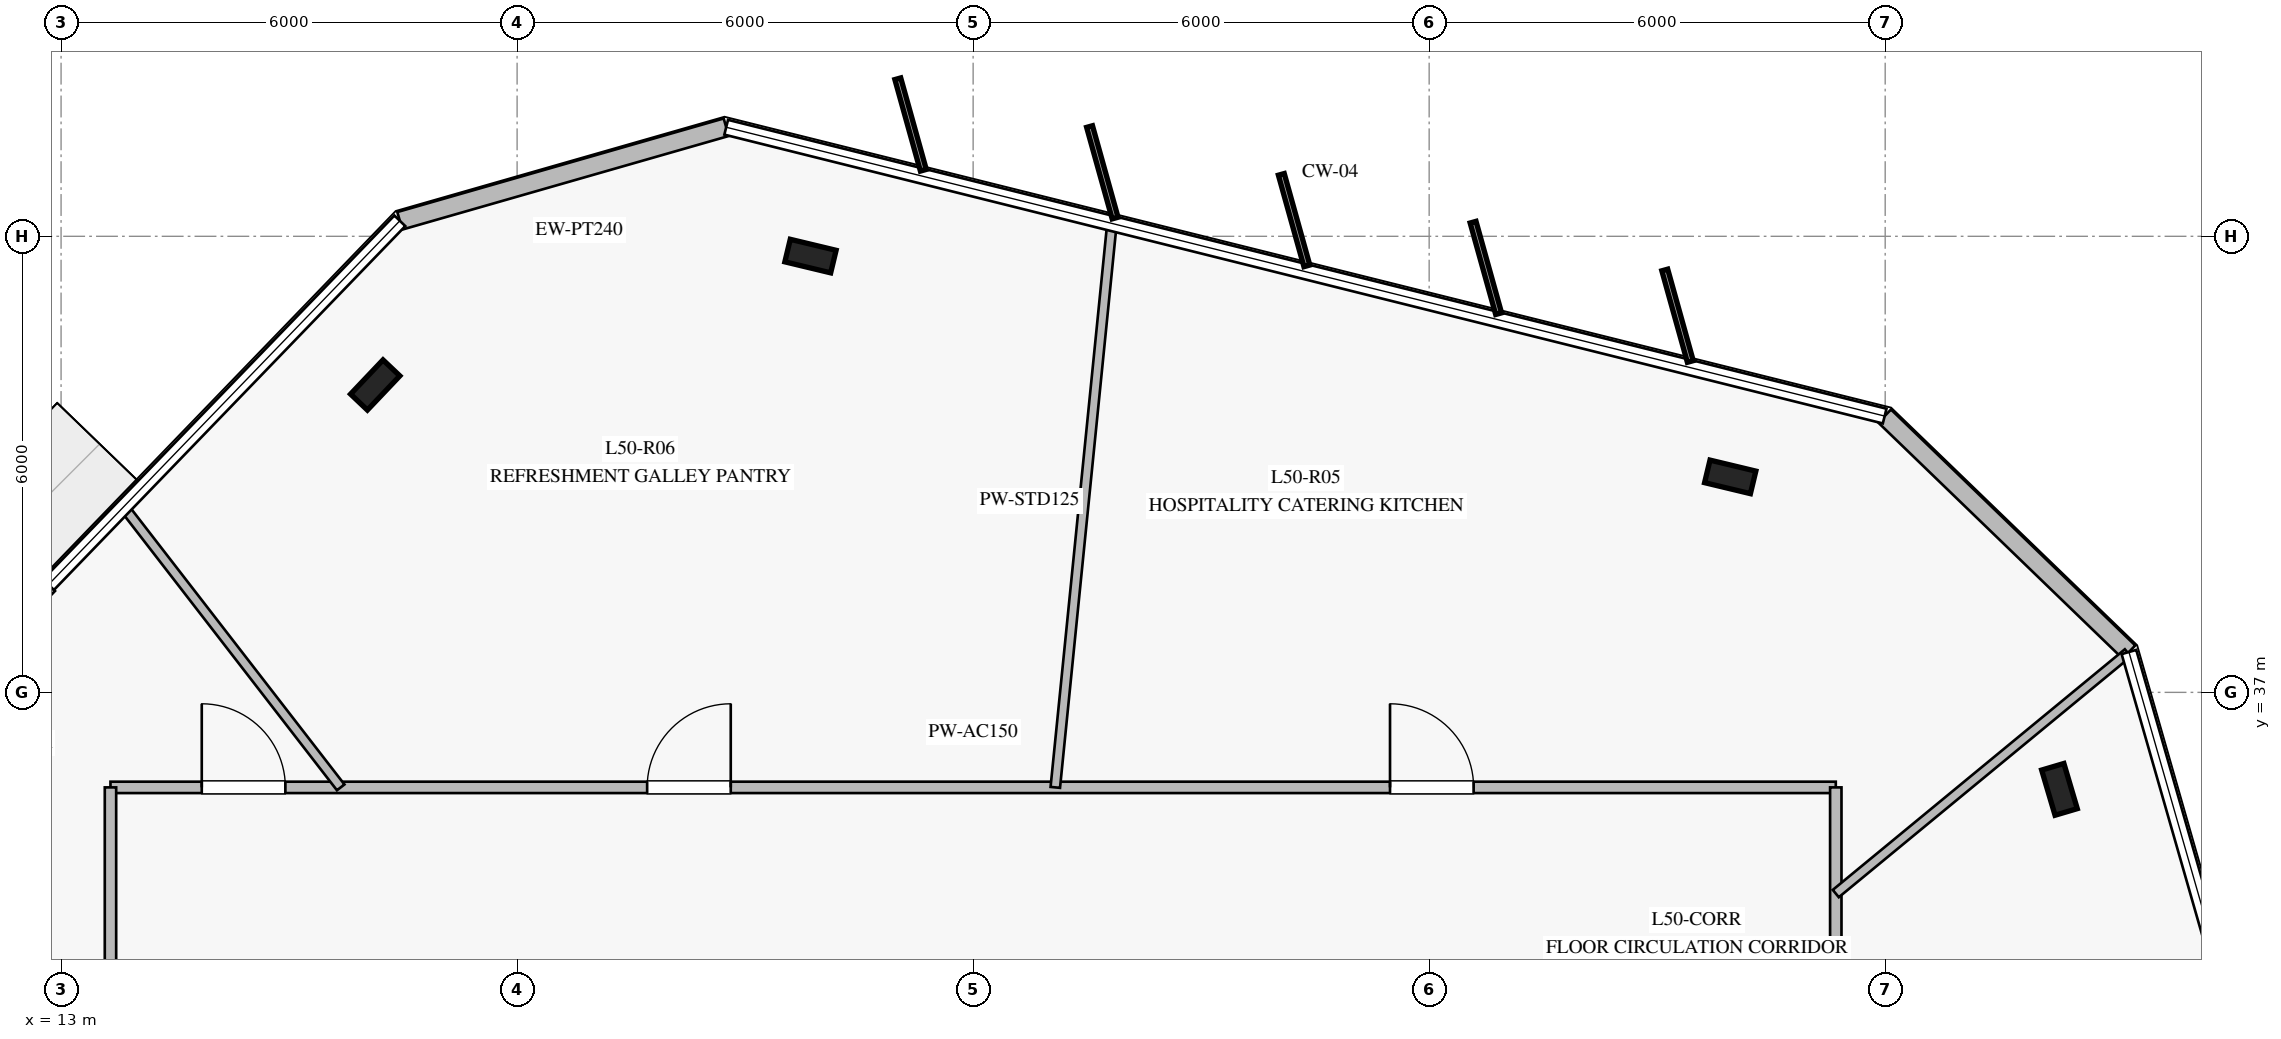
"""IFC4 building model, lengths in metres.
Left out: names, types, materials, properties, quantities, classifications, styles, units other than length and angle.
Written with IfcOpenShell. Run it as: python <this file> out.ifc"""

import sys

from ifc_helpers import new_model, si_unit, direction, frame, frame_2d, origin, origin_2d, place, context, subcontext, project, spatial, rectangle, i_section, extrude, element, fill, save


model = new_model("IFC4")
c1 = context("Model", 3, precision=1e-05, world=origin(), true_north=direction((0.0, 1.0)))
c2 = subcontext(c1, "Body", "Model", "MODEL_VIEW")
j1 = project(units=[si_unit("LENGTHUNIT", "METRE"), si_unit("PLANEANGLEUNIT", "RADIAN")], contexts=[c1])
p1 = place(None, origin())
s1 = spatial("IfcSite", under=j1, at=p1, CompositionType="ELEMENT")
p2 = place(p1, origin())
s2 = spatial("IfcBuilding", under=s1, at=p2, CompositionType="ELEMENT")
p3 = place(p2, frame((0.0, 0.0, 208.8)))
s3 = spatial("IfcBuildingStorey", under=s2, at=p3, CompositionType="ELEMENT", Elevation=208.8)
for number, where, z_axis, x_axis in (
    (1, (34.961, 39.835, 0.0), (0.0, 0.0, 1.0), (-0.972, 0.233, 0.0)),
    (2, (22.86, 42.74, 0.0), (0.0, 0.0, 1.0), (-0.972, 0.233, 0.0)),
    (3, (17.133, 41.044, 0.0), (0.0, 0.0, 1.0), (0.688, 0.725, 0.0)),
    (4, (39.293, 35.724, 0.0), (0.0, 0.0, 1.0), (-0.284, 0.959, 0.0)),
):
    element("IfcColumn", number, at=place(p3, frame(where, z_axis=z_axis, x_axis=x_axis)), inside=s3, PredefinedType="COLUMN", context=c2, shape_type="SweptSolid", body=[
        extrude(i_section(OverallWidth=0.305, OverallDepth=0.62, WebThickness=0.021, FlangeThickness=0.04, at=origin_2d()), origin(), (0.0, 0.0, 1.0), 4.0),
    ])
p4 = place(p3, frame((21.751, 44.435, 0.0), z_axis=(0.0, 0.0, 1.0), x_axis=(-0.961280198868, -0.275572820258, 0.0)))
e5 = element("IfcWall", 5, at=p4, inside=s3, PredefinedType="STANDARD", context=c2, shape_type="SweptSolid", body=[
    extrude(rectangle(XDim=4.467, YDim=0.24, at=frame_2d((2.233, 0.0))), origin(), (0.0, 0.0, 1.0), 3.78),
])
p5 = place(p3, frame((12.834, 38.417, 0.0), z_axis=(0.0, 0.0, 1.0), x_axis=(-0.694688923552, -0.719310294305, 0.0)))
e6 = element("IfcWall", 6, at=p5, inside=s3, PredefinedType="STANDARD", context=c2, shape_type="SweptSolid", body=[
    extrude(rectangle(XDim=2.4, YDim=0.24, at=frame_2d((1.2, 0.0))), origin(), (0.0, 0.0, 1.0), 3.78),
])
p6 = place(p5, frame((0.4, 0.0, 0.0)))
e7 = element("IfcOpeningElement", 7, at=p6, cuts=e6, PredefinedType="OPENING", context=c2, shape_type="SweptSolid", body=[
    extrude(rectangle(XDim=1.6, YDim=2.25, at=frame_2d((0.8, 1.125))), frame((0.0, 0.13, 0.0), z_axis=(0.0, -1.0, 0.0), x_axis=(1.0, 0.0, 0.0)), (0.0, 0.0, 1.0), 0.26),
])
p7 = place(p3, frame((40.207, 37.531, 0.0), z_axis=(0.0, 0.0, 1.0), x_axis=(-0.719320489357, 0.69467836701, 0.0)))
e8 = element("IfcWall", 8, at=p7, inside=s3, PredefinedType="STANDARD", context=c2, shape_type="SweptSolid", body=[
    extrude(rectangle(XDim=4.468, YDim=0.24, at=frame_2d((2.234, 0.0))), origin(), (0.0, 0.0, 1.0), 3.78),
])
p8 = place(p3, frame((13.65, 35.75, 0.0), z_axis=(0.0, 0.0, 1.0), x_axis=(1.0, 0.0, 0.0)))
e9 = element("IfcWall", 9, at=p8, inside=s3, PredefinedType="PARTITIONING", context=c2, shape_type="SweptSolid", body=[
    extrude(rectangle(XDim=22.7, YDim=0.15, at=frame_2d((11.35, 0.0))), origin(), (0.0, 0.0, 1.0), 3.28),
])
p9 = place(p8, frame((16.835, 0.0, 0.0)))
e10 = element("IfcOpeningElement", 10, at=p9, cuts=e9, PredefinedType="OPENING", context=c2, shape_type="SweptSolid", body=[
    extrude(rectangle(XDim=1.1, YDim=2.2, at=frame_2d((0.55, 1.1))), frame((0.0, 0.085, 0.0), z_axis=(0.0, -1.0, 0.0), x_axis=(1.0, 0.0, 0.0)), (0.0, 0.0, 1.0), 0.17),
])
p10 = place(p8, frame((7.061, 0.0, 0.0)))
e11 = element("IfcOpeningElement", 11, at=p10, cuts=e9, PredefinedType="OPENING", context=c2, shape_type="SweptSolid", body=[
    extrude(rectangle(XDim=1.1, YDim=2.2, at=frame_2d((0.55, 1.1))), frame((0.0, 0.085, 0.0), z_axis=(0.0, -1.0, 0.0), x_axis=(1.0, 0.0, 0.0)), (0.0, 0.0, 1.0), 0.17),
])
p11 = place(p8, frame((1.201, 0.0, 0.0)))
e12 = element("IfcOpeningElement", 12, at=p11, cuts=e9, PredefinedType="OPENING", context=c2, shape_type="SweptSolid", body=[
    extrude(rectangle(XDim=1.1, YDim=2.2, at=frame_2d((0.55, 1.1))), frame((0.0, 0.085, 0.0), z_axis=(0.0, -1.0, 0.0), x_axis=(1.0, 0.0, 0.0)), (0.0, 0.0, 1.0), 0.17),
])
p12 = place(p3, frame((36.35, 35.75, 0.0), z_axis=(0.0, 0.0, 1.0), x_axis=(0.0, -1.0, 0.0)))
e13 = element("IfcWall", 13, at=p12, inside=s3, PredefinedType="PARTITIONING", context=c2, shape_type="SweptSolid", body=[
    extrude(rectangle(XDim=21.5, YDim=0.15, at=frame_2d((10.75, 0.0))), origin(), (0.0, 0.0, 1.0), 3.05),
])
p13 = place(p12, frame((16.142, 0.0, 0.0)))
e14 = element("IfcOpeningElement", 14, at=p13, cuts=e13, PredefinedType="OPENING", context=c2, shape_type="SweptSolid", body=[
    extrude(rectangle(XDim=1.1, YDim=2.2, at=frame_2d((0.55, 1.1))), frame((0.0, 0.085, 0.0), z_axis=(0.0, -1.0, 0.0), x_axis=(1.0, 0.0, 0.0)), (0.0, 0.0, 1.0), 0.17),
])
p14 = place(p12, frame((6.148, 0.0, 0.0)))
e15 = element("IfcOpeningElement", 15, at=p14, cuts=e13, PredefinedType="OPENING", context=c2, shape_type="SweptSolid", body=[
    extrude(rectangle(XDim=1.1, YDim=2.2, at=frame_2d((0.55, 1.1))), frame((0.0, 0.085, 0.0), z_axis=(0.0, -1.0, 0.0), x_axis=(1.0, 0.0, 0.0)), (0.0, 0.0, 1.0), 0.17),
])
p15 = place(p3, frame((13.65, 14.25, 0.0), z_axis=(0.0, 0.0, 1.0), x_axis=(0.0, 1.0, 0.0)))
e16 = element("IfcWall", 16, at=p15, inside=s3, PredefinedType="PARTITIONING", context=c2, shape_type="SweptSolid", body=[
    extrude(rectangle(XDim=21.5, YDim=0.15, at=frame_2d((10.75, 0.0))), origin(), (0.0, 0.0, 1.0), 3.05),
])
p16 = place(p3, frame((26.081, 35.75, 0.0), z_axis=(0.0, 0.0, 1.0), x_axis=(0.099981283252, 0.994989318033, 0.0)))
e17 = element("IfcWall", 17, at=p16, inside=s3, PredefinedType="PARTITIONING", context=c2, shape_type="SweptSolid", body=[
    extrude(rectangle(XDim=7.44, YDim=0.125, at=frame_2d((3.72, 0.0))), origin(), (0.0, 0.0, 1.0), 3.18),
])
p17 = place(p3, frame((16.679, 35.75, 0.0), z_axis=(0.0, 0.0, 1.0), x_axis=(-0.611968816435, 0.79088189239, 0.0)))
e18 = element("IfcWall", 18, at=p17, inside=s3, PredefinedType="PARTITIONING", context=c2, shape_type="SweptSolid", body=[
    extrude(rectangle(XDim=4.65, YDim=0.125, at=frame_2d((2.325, 0.0))), origin(), (0.0, 0.0, 1.0), 3.18),
])
p18 = place(p3, frame((36.35, 34.353, 0.0), z_axis=(0.0, 0.0, 1.0), x_axis=(0.771814163285, 0.63584817162, 0.0)))
e19 = element("IfcWall", 19, at=p18, inside=s3, PredefinedType="PARTITIONING", context=c2, shape_type="SweptSolid", body=[
    extrude(rectangle(XDim=4.979, YDim=0.125, at=frame_2d((2.49, 0.0))), origin(), (0.0, 0.0, 1.0), 3.18),
])
p19 = place(p9, origin())
e20 = element("IfcDoor", 20, at=p19, inside=s3, OperationType="SINGLE_SWING_LEFT", PredefinedType="DOOR", context=c2, shape_type="SweptSolid", body=[
    extrude(rectangle(XDim=1.1, YDim=2.2, at=frame_2d((0.55, 1.1))), frame((0.0, 0.025, 0.0), z_axis=(0.0, -1.0, 0.0), x_axis=(1.0, 0.0, 0.0)), (0.0, 0.0, 1.0), 0.05),
])
fill(e10, e20)
p20 = place(p10, origin())
e21 = element("IfcDoor", 21, at=p20, inside=s3, OperationType="SINGLE_SWING_RIGHT", PredefinedType="DOOR", context=c2, shape_type="SweptSolid", body=[
    extrude(rectangle(XDim=1.1, YDim=2.2, at=frame_2d((0.55, 1.1))), frame((0.0, 0.025, 0.0), z_axis=(0.0, -1.0, 0.0), x_axis=(1.0, 0.0, 0.0)), (0.0, 0.0, 1.0), 0.05),
])
fill(e11, e21)
p21 = place(p11, origin())
e22 = element("IfcDoor", 22, at=p21, inside=s3, OperationType="SINGLE_SWING_LEFT", PredefinedType="DOOR", context=c2, shape_type="SweptSolid", body=[
    extrude(rectangle(XDim=1.1, YDim=2.2, at=frame_2d((0.55, 1.1))), frame((0.0, 0.025, 0.0), z_axis=(0.0, -1.0, 0.0), x_axis=(1.0, 0.0, 0.0)), (0.0, 0.0, 1.0), 0.05),
])
fill(e12, e22)
save(model, sys.argv[1])
